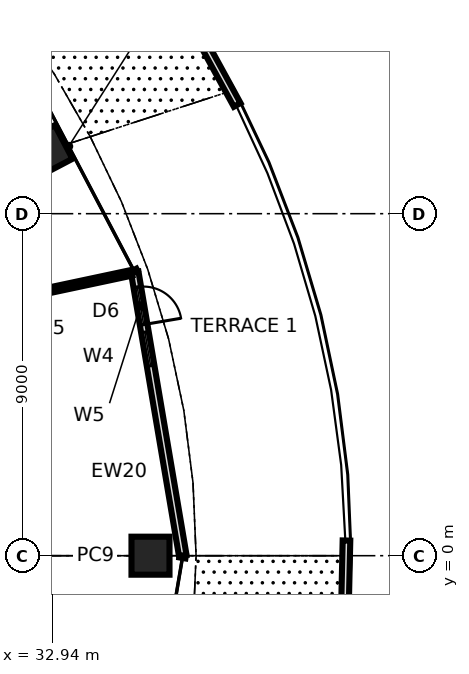
"""IFC4 building model, lengths in metres.
Left out: names, types, materials, properties, quantities, classifications, styles, units other than length and angle.
Written with IfcOpenShell. Run it as: python <this file> out.ifc"""

import sys

from ifc_helpers import new_model, si_unit, direction, frame, frame_2d, origin, origin_2d, place, context, subcontext, project, spatial, rectangle, extrude, element, fill, save


model = new_model("IFC4")
c1 = context("Model", 3, precision=1e-05, world=origin(), true_north=direction((0.0, 1.0)))
c2 = subcontext(c1, "Body", "Model", "MODEL_VIEW")
j1 = project(units=[si_unit("LENGTHUNIT", "METRE"), si_unit("PLANEANGLEUNIT", "RADIAN")], contexts=[c1])
p1 = place(None, origin())
s1 = spatial("IfcSite", under=j1, at=p1, CompositionType="ELEMENT")
p2 = place(p1, origin())
s2 = spatial("IfcBuilding", under=s1, at=p2, CompositionType="ELEMENT")
p3 = place(p2, frame((0.0, 0.0, 10.6)))
s3 = spatial("IfcBuildingStorey", under=s2, at=p3, CompositionType="ELEMENT", Elevation=10.6)
for number, where, z_axis, x_axis in (
    (1, (35.52, 0.0, 0.0), (0.0, 0.0, 1.0), (1.0, 0.0, 0.0)),
    (2, (32.794, 10.655, 0.0), (0.0, 0.0, 1.0), (0.885, 0.465, 0.0)),
):
    element("IfcColumn", number, at=place(p3, frame(where, z_axis=z_axis, x_axis=x_axis)), inside=s3, PredefinedType="COLUMN", context=c2, shape_type="SweptSolid", body=[
        extrude(rectangle(XDim=1.0, YDim=1.0, at=origin_2d()), origin(), (0.0, 0.0, 1.0), 4.5),
    ])
p4 = place(p3, frame((36.37, 0.0, 0.0), z_axis=(0.0, 0.0, 1.0), x_axis=(-0.167128957737, 0.985935044253, 0.0)))
e3 = element("IfcWall", 3, at=p4, inside=s3, PredefinedType="SOLIDWALL", context=c2, shape_type="SweptSolid", body=[
    extrude(rectangle(XDim=7.568, YDim=0.2, at=frame_2d((3.784, 0.0))), origin(), (0.0, 0.0, 1.0), 4.3),
])
p5 = place(p4, frame((6.168, 0.0, 0.0)))
e4 = element("IfcOpeningElement", 4, at=p5, cuts=e3, PredefinedType="OPENING", context=c2, shape_type="SweptSolid", body=[
    extrude(rectangle(XDim=1.0, YDim=2.4, at=frame_2d((0.5, 1.2))), frame((0.0, 0.11, 0.0), z_axis=(0.0, -1.0, 0.0), x_axis=(1.0, 0.0, 0.0)), (0.0, 0.0, 1.0), 0.22),
])
p6 = place(p4, frame((5.068, 0.0, 0.3)))
e5 = element("IfcOpeningElement", 5, at=p6, cuts=e3, PredefinedType="OPENING", context=c2, shape_type="SweptSolid", body=[
    extrude(rectangle(XDim=0.9, YDim=2.1, at=frame_2d((0.45, 1.05))), frame((0.0, 0.11, 0.0), z_axis=(0.0, -1.0, 0.0), x_axis=(1.0, 0.0, 0.0)), (0.0, 0.0, 1.0), 0.22),
])
p7 = place(p4, frame((6.168, 0.0, 2.7)))
e6 = element("IfcOpeningElement", 6, at=p7, cuts=e3, PredefinedType="OPENING", context=c2, shape_type="SweptSolid", body=[
    extrude(rectangle(XDim=1.0, YDim=0.6, at=frame_2d((0.5, 0.3))), frame((0.0, 0.11, 0.0), z_axis=(0.0, -1.0, 0.0), x_axis=(1.0, 0.0, 0.0)), (0.0, 0.0, 1.0), 0.22),
])
p8 = place(p3, frame((37.801, 11.862, 0.0), z_axis=(0.0, 0.0, 1.0), x_axis=(-0.479780162958, 0.877388736668, 0.0)))
e7 = element("IfcWall", 7, at=p8, inside=s3, PredefinedType="PARAPET", context=c2, shape_type="SweptSolid", body=[
    extrude(rectangle(XDim=1.916, YDim=0.2, at=frame_2d((0.958, 0.0))), origin(), (0.0, 0.0, 1.0), 1.1),
])
p9 = place(p3, frame((40.633, -1.542, 0.0), z_axis=(0.0, 0.0, 1.0), x_axis=(0.02251567963, 0.999746489952, 0.0)))
e8 = element("IfcWall", 8, at=p9, inside=s3, PredefinedType="PARAPET", context=c2, shape_type="SweptSolid", body=[
    extrude(rectangle(XDim=1.941, YDim=0.2, at=frame_2d((0.97, 0.0))), origin(), (0.0, 0.0, 1.0), 1.1),
])
p10 = place(p3, frame((29.679, 6.308, 0.0), z_axis=(0.0, 0.0, 1.0), x_axis=(0.97814284779, 0.207934050402, 0.0)))
e9 = element("IfcWall", 9, at=p10, inside=s3, PredefinedType="PARTITIONING", context=c2, shape_type="SweptSolid", body=[
    extrude(rectangle(XDim=5.468, YDim=0.15, at=frame_2d((2.734, 0.0))), origin(), (0.0, 0.0, 1.0), 4.3),
])
p11 = place(p5, frame((1.0, 0.0, 0.0), z_axis=(0.0, 0.0, 1.0), x_axis=(-1.0, 0.0, 0.0)))
e10 = element("IfcDoor", 10, at=p11, inside=s3, OperationType="SINGLE_SWING_RIGHT", PredefinedType="DOOR", context=c2, shape_type="SweptSolid", body=[
    extrude(rectangle(XDim=1.0, YDim=2.4, at=frame_2d((0.5, 1.2))), frame((0.0, 0.025, 0.0), z_axis=(0.0, -1.0, 0.0), x_axis=(1.0, 0.0, 0.0)), (0.0, 0.0, 1.0), 0.05),
])
fill(e4, e10)
p12 = place(p6, origin())
e11 = element("IfcWindow", 11, at=p12, inside=s3, PartitioningType="SINGLE_PANEL", PredefinedType="WINDOW", context=c2, shape_type="SweptSolid", body=[
    extrude(rectangle(XDim=0.9, YDim=2.1, at=frame_2d((0.45, 1.05))), frame((0.0, 0.03, 0.0), z_axis=(0.0, -1.0, 0.0), x_axis=(1.0, 0.0, 0.0)), (0.0, 0.0, 1.0), 0.06),
])
fill(e5, e11)
p13 = place(p7, origin())
e12 = element("IfcWindow", 12, at=p13, inside=s3, PartitioningType="SINGLE_PANEL", PredefinedType="WINDOW", context=c2, shape_type="SweptSolid", body=[
    extrude(rectangle(XDim=1.0, YDim=0.6, at=frame_2d((0.5, 0.3))), frame((0.0, 0.03, 0.0), z_axis=(0.0, -1.0, 0.0), x_axis=(1.0, 0.0, 0.0)), (0.0, 0.0, 1.0), 0.06),
])
fill(e6, e12)
save(model, sys.argv[1])
